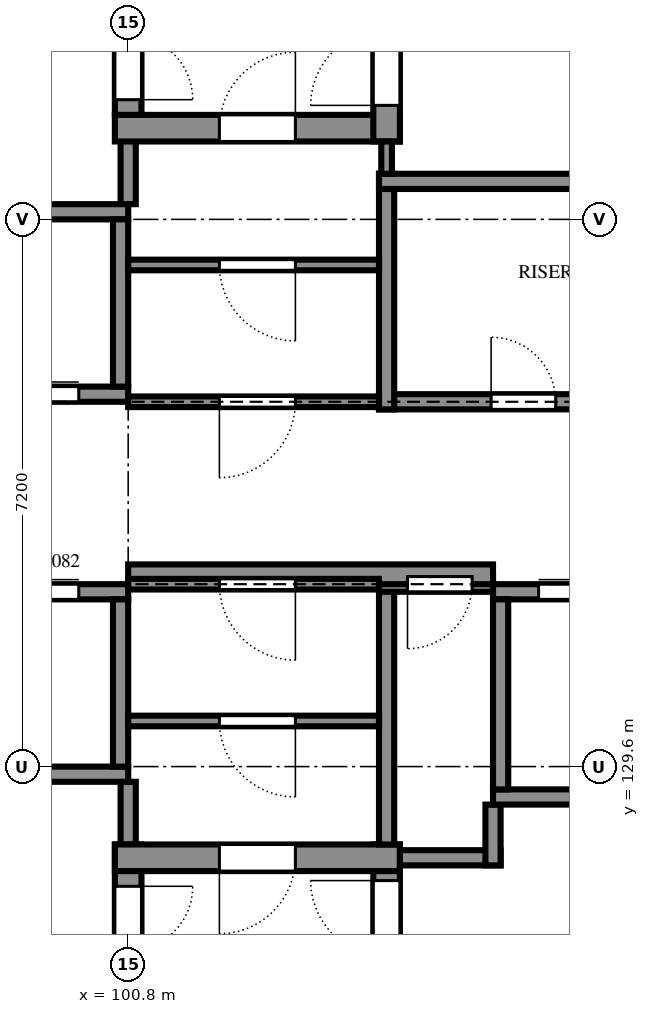
"""IFC4 building model, lengths in metres.
Left out: names, types, materials, properties, quantities, classifications, styles, units other than length and angle.
Written with IfcOpenShell. Run it as: python <this file> out.ifc"""

import sys

from ifc_helpers import new_model, si_unit, direction, frame, frame_2d, origin, place, context, subcontext, project, spatial, rectangle, extrude, element, fill, save


model = new_model("IFC4")
c1 = context("Model", 3, precision=1e-05, world=origin(), true_north=direction((0.0, 1.0)))
c2 = subcontext(c1, "Body", "Model", "MODEL_VIEW")
j1 = project(units=[si_unit("LENGTHUNIT", "METRE"), si_unit("PLANEANGLEUNIT", "RADIAN")], contexts=[c1])
p1 = place(None, origin())
s1 = spatial("IfcSite", under=j1, at=p1, CompositionType="ELEMENT")
p2 = place(p1, origin())
s2 = spatial("IfcBuilding", under=s1, at=p2, CompositionType="ELEMENT")
p3 = place(p2, frame((0.0, 0.0, 25.2)))
s3 = spatial("IfcBuildingStorey", under=s2, at=p3, CompositionType="ELEMENT", Elevation=25.2)
p4 = place(p3, frame((104.2, 125.1, 0.0), z_axis=(0.0, 0.0, 1.0), x_axis=(0.0, 1.0, 0.0)))
e1 = element("IfcWall", 1, at=p4, inside=s3, PredefinedType="SHEAR", context=c2, shape_type="SweptSolid", body=[
    extrude(rectangle(XDim=3.475, YDim=0.35, at=frame_2d((1.737, 0.0))), origin(), (0.0, 0.0, 1.0), 3.6),
])
p5 = place(p4, frame((2.0, 0.0, 0.0)))
e2 = element("IfcOpeningElement", 2, at=p5, cuts=e1, PredefinedType="OPENING", context=c2, shape_type="SweptSolid", body=[
    extrude(rectangle(XDim=1.0, YDim=2.1, at=frame_2d((0.5, 1.05))), frame((0.0, 0.185, 0.0), z_axis=(0.0, -1.0, 0.0), x_axis=(1.0, 0.0, 0.0)), (0.0, 0.0, 1.0), 0.37),
])
p6 = place(p3, frame((100.8, 128.575, 0.0), z_axis=(0.0, 0.0, 1.0), x_axis=(0.0, -1.0, 0.0)))
e3 = element("IfcWall", 3, at=p6, inside=s3, PredefinedType="SHEAR", context=c2, shape_type="SweptSolid", body=[
    extrude(rectangle(XDim=6.35, YDim=0.35, at=frame_2d((3.175, 0.0))), origin(), (0.0, 0.0, 1.0), 3.6),
])
p7 = place(p6, frame((0.55, 0.0, 0.0)))
e4 = element("IfcOpeningElement", 4, at=p7, cuts=e3, PredefinedType="OPENING", context=c2, shape_type="SweptSolid", body=[
    extrude(rectangle(XDim=0.85, YDim=2.1, at=frame_2d((0.425, 1.05))), frame((0.0, 0.185, 0.0), z_axis=(0.0, -1.0, 0.0), x_axis=(1.0, 0.0, 0.0)), (0.0, 0.0, 1.0), 0.37),
])
p8 = place(p3, frame((100.8, 128.575, 0.0), z_axis=(0.0, 0.0, 1.0), x_axis=(0.0, 1.0, 0.0)))
e5 = element("IfcWall", 5, at=p8, inside=s3, PredefinedType="SHEAR", context=c2, shape_type="SweptSolid", body=[
    extrude(rectangle(XDim=0.825, YDim=0.2, at=frame_2d((0.413, 0.0))), origin(), (0.0, 0.0, 1.0), 3.6),
])
p9 = place(p3, frame((104.375, 128.4, 0.0), z_axis=(0.0, 0.0, 1.0), x_axis=(-1.0, 0.0, 0.0)))
e6 = element("IfcWall", 6, at=p9, inside=s3, PredefinedType="SHEAR", context=c2, shape_type="SweptSolid", body=[
    extrude(rectangle(XDim=3.75, YDim=0.35, at=frame_2d((1.875, 0.0))), origin(), (0.0, 0.0, 1.0), 3.6),
])
p10 = place(p9, frame((1.375, 0.0, 0.0)))
e7 = element("IfcOpeningElement", 7, at=p10, cuts=e6, PredefinedType="OPENING", context=c2, shape_type="SweptSolid", body=[
    extrude(rectangle(XDim=1.0, YDim=2.1, at=frame_2d((0.5, 1.05))), frame((0.0, 0.185, 0.0), z_axis=(0.0, -1.0, 0.0), x_axis=(1.0, 0.0, 0.0)), (0.0, 0.0, 1.0), 0.37),
])
p11 = place(p3, frame((104.375, 128.4, 0.0), z_axis=(0.0, 0.0, 1.0), x_axis=(1.0, 0.0, 0.0)))
e8 = element("IfcWall", 8, at=p11, inside=s3, PredefinedType="SHEAR", context=c2, shape_type="SweptSolid", body=[
    extrude(rectangle(XDim=1.325, YDim=0.2, at=frame_2d((0.663, 0.0))), origin(), (0.0, 0.0, 1.0), 3.6),
])
p12 = place(p3, frame((105.6, 128.3, 0.0), z_axis=(0.0, 0.0, 1.0), x_axis=(0.0, 1.0, 0.0)))
e9 = element("IfcWall", 9, at=p12, inside=s3, PredefinedType="SHEAR", context=c2, shape_type="SweptSolid", body=[
    extrude(rectangle(XDim=0.8, YDim=0.2, at=frame_2d((0.4, 0.0))), origin(), (0.0, 0.0, 1.0), 3.6),
])
p13 = place(p3, frame((104.2, 132.1, 0.0), z_axis=(0.0, 0.0, 1.0), x_axis=(0.0, -1.0, 0.0)))
e10 = element("IfcWall", 10, at=p13, inside=s3, PredefinedType="SHEAR", context=c2, shape_type="SweptSolid", body=[
    extrude(rectangle(XDim=3.525, YDim=0.2, at=frame_2d((1.763, 0.0))), origin(), (0.0, 0.0, 1.0), 3.6),
])
p14 = place(p3, frame((105.6, 132.0, 0.0), z_axis=(0.0, 0.0, 1.0), x_axis=(-1.0, 0.0, 0.0)))
e11 = element("IfcWall", 11, at=p14, inside=s3, PredefinedType="SHEAR", context=c2, shape_type="SweptSolid", body=[
    extrude(rectangle(XDim=1.5, YDim=0.2, at=frame_2d((0.75, 0.0))), origin(), (0.0, 0.0, 1.0), 3.6),
])
p15 = place(p14, frame((0.275, 0.0, 0.0)))
e12 = element("IfcOpeningElement", 12, at=p15, cuts=e11, PredefinedType="OPENING", context=c2, shape_type="SweptSolid", body=[
    extrude(rectangle(XDim=0.85, YDim=2.1, at=frame_2d((0.425, 1.05))), frame((0.0, 0.11, 0.0), z_axis=(0.0, -1.0, 0.0), x_axis=(1.0, 0.0, 0.0)), (0.0, 0.0, 1.0), 0.22),
])
p16 = place(p3, frame((104.1, 134.4, 0.0), z_axis=(0.0, 0.0, 1.0), x_axis=(1.0, 0.0, 0.0)))
e13 = element("IfcWall", 13, at=p16, inside=s3, PredefinedType="SHEAR", context=c2, shape_type="SweptSolid", body=[
    extrude(rectangle(XDim=4.1, YDim=0.2, at=frame_2d((2.05, 0.0))), origin(), (0.0, 0.0, 1.0), 3.6),
])
p17 = place(p16, frame((1.475, 0.0, 0.0)))
e14 = element("IfcOpeningElement", 14, at=p17, cuts=e13, PredefinedType="OPENING", context=c2, shape_type="SweptSolid", body=[
    extrude(rectangle(XDim=0.85, YDim=2.1, at=frame_2d((0.425, 1.05))), frame((0.0, 0.11, 0.0), z_axis=(0.0, -1.0, 0.0), x_axis=(1.0, 0.0, 0.0)), (0.0, 0.0, 1.0), 0.22),
])
p18 = place(p3, frame((100.8, 137.0, 0.0), z_axis=(0.0, 0.0, 1.0), x_axis=(0.0, 1.0, 0.0)))
e15 = element("IfcWall", 15, at=p18, inside=s3, PredefinedType="SHEAR", context=c2, shape_type="SweptSolid", body=[
    extrude(rectangle(XDim=1.175, YDim=0.2, at=frame_2d((0.587, 0.0))), origin(), (0.0, 0.0, 1.0), 3.6),
])
p19 = place(p3, frame((104.2, 137.4, 0.0), z_axis=(0.0, 0.0, 1.0), x_axis=(0.0, -1.0, 0.0)))
e16 = element("IfcWall", 16, at=p19, inside=s3, PredefinedType="SHEAR", context=c2, shape_type="SweptSolid", body=[
    extrude(rectangle(XDim=3.1, YDim=0.2, at=frame_2d((1.55, 0.0))), origin(), (0.0, 0.0, 1.0), 3.6),
])
p20 = place(p3, frame((108.2, 137.3, 0.0), z_axis=(0.0, 0.0, 1.0), x_axis=(-1.0, 0.0, 0.0)))
e17 = element("IfcWall", 17, at=p20, inside=s3, PredefinedType="SHEAR", context=c2, shape_type="SweptSolid", body=[
    extrude(rectangle(XDim=4.1, YDim=0.2, at=frame_2d((2.05, 0.0))), origin(), (0.0, 0.0, 1.0), 3.6),
])
p21 = place(p3, frame((100.625, 138.0, 0.0), z_axis=(0.0, 0.0, 1.0), x_axis=(1.0, 0.0, 0.0)))
e18 = element("IfcWall", 18, at=p21, inside=s3, PredefinedType="SHEAR", context=c2, shape_type="SweptSolid", body=[
    extrude(rectangle(XDim=3.75, YDim=0.35, at=frame_2d((1.875, 0.0))), origin(), (0.0, 0.0, 1.0), 3.6),
])
p22 = place(p21, frame((1.375, 0.0, 0.0)))
e19 = element("IfcOpeningElement", 19, at=p22, cuts=e18, PredefinedType="OPENING", context=c2, shape_type="SweptSolid", body=[
    extrude(rectangle(XDim=1.0, YDim=2.1, at=frame_2d((0.5, 1.05))), frame((0.0, 0.185, 0.0), z_axis=(0.0, -1.0, 0.0), x_axis=(1.0, 0.0, 0.0)), (0.0, 0.0, 1.0), 0.37),
])
p23 = place(p3, frame((104.2, 137.825, 0.0), z_axis=(0.0, 0.0, 1.0), x_axis=(0.0, 1.0, 0.0)))
e20 = element("IfcWall", 20, at=p23, inside=s3, PredefinedType="SHEAR", context=c2, shape_type="SweptSolid", body=[
    extrude(rectangle(XDim=3.475, YDim=0.35, at=frame_2d((1.738, 0.0))), origin(), (0.0, 0.0, 1.0), 3.6),
])
p24 = place(p23, frame((0.475, 0.0, 0.0)))
e21 = element("IfcOpeningElement", 21, at=p24, cuts=e20, PredefinedType="OPENING", context=c2, shape_type="SweptSolid", body=[
    extrude(rectangle(XDim=1.0, YDim=2.1, at=frame_2d((0.5, 1.05))), frame((0.0, 0.185, 0.0), z_axis=(0.0, -1.0, 0.0), x_axis=(1.0, 0.0, 0.0)), (0.0, 0.0, 1.0), 0.37),
])
p25 = place(p3, frame((100.8, 144.175, 0.0), z_axis=(0.0, 0.0, 1.0), x_axis=(0.0, -1.0, 0.0)))
e22 = element("IfcWall", 22, at=p25, inside=s3, PredefinedType="SHEAR", context=c2, shape_type="SweptSolid", body=[
    extrude(rectangle(XDim=6.0, YDim=0.35, at=frame_2d((3.0, 0.0))), origin(), (0.0, 0.0, 1.0), 3.6),
])
p26 = place(p25, frame((4.95, 0.0, 0.0)))
e23 = element("IfcOpeningElement", 23, at=p26, cuts=e22, PredefinedType="OPENING", context=c2, shape_type="SweptSolid", body=[
    extrude(rectangle(XDim=0.85, YDim=2.1, at=frame_2d((0.425, 1.05))), frame((0.0, 0.185, 0.0), z_axis=(0.0, -1.0, 0.0), x_axis=(1.0, 0.0, 0.0)), (0.0, 0.0, 1.0), 0.37),
])
p27 = place(p3, frame((100.8, 132.13, 3.6), z_axis=(0.0, 0.0, 1.0), x_axis=(1.0, 0.0, 0.0)))
e24 = element("IfcWall", 24, at=p27, inside=s3, PredefinedType="PARAPET", context=c2, shape_type="SweptSolid", body=[
    extrude(rectangle(XDim=4.8, YDim=0.26, at=frame_2d((2.4, 0.0))), origin(), (0.0, 0.0, 1.0), 1.0),
])
p28 = place(p3, frame((98.4, 129.5, 0.0), z_axis=(0.0, 0.0, 1.0), x_axis=(1.0, 0.0, 0.0)))
e25 = element("IfcWall", 25, at=p28, inside=s3, PredefinedType="SHEAR", context=c2, shape_type="SweptSolid", body=[
    extrude(rectangle(XDim=2.4, YDim=0.2, at=frame_2d((1.2, 0.0))), origin(), (0.0, 0.0, 1.0), 4.5),
])
p29 = place(p3, frame((98.4, 131.9, 0.0), z_axis=(0.0, 0.0, 1.0), x_axis=(1.0, 0.0, 0.0)))
e26 = element("IfcWall", 26, at=p29, inside=s3, PredefinedType="SHEAR", context=c2, shape_type="SweptSolid", body=[
    extrude(rectangle(XDim=2.4, YDim=0.2, at=frame_2d((1.2, 0.0))), origin(), (0.0, 0.0, 1.0), 4.5),
])
p30 = place(p29, frame((0.65, 0.0, 0.0)))
e27 = element("IfcOpeningElement", 27, at=p30, cuts=e26, PredefinedType="OPENING", context=c2, shape_type="SweptSolid", body=[
    extrude(rectangle(XDim=1.1, YDim=2.1, at=frame_2d((0.55, 1.05))), frame((0.0, 0.11, 0.0), z_axis=(0.0, -1.0, 0.0), x_axis=(1.0, 0.0, 0.0)), (0.0, 0.0, 1.0), 0.22),
])
p31 = place(p3, frame((100.7, 129.6, 0.0), z_axis=(0.0, 0.0, 1.0), x_axis=(0.0, 1.0, 0.0)))
e28 = element("IfcWall", 28, at=p31, inside=s3, PredefinedType="SHEAR", context=c2, shape_type="SweptSolid", body=[
    extrude(rectangle(XDim=2.2, YDim=0.2, at=frame_2d((1.1, 0.0))), origin(), (0.0, 0.0, 1.0), 4.5),
])
p32 = place(p3, frame((98.4, 134.5, 0.0), z_axis=(0.0, 0.0, 1.0), x_axis=(1.0, 0.0, 0.0)))
e29 = element("IfcWall", 29, at=p32, inside=s3, PredefinedType="SHEAR", context=c2, shape_type="SweptSolid", body=[
    extrude(rectangle(XDim=2.4, YDim=0.2, at=frame_2d((1.2, 0.0))), origin(), (0.0, 0.0, 1.0), 4.5),
])
p33 = place(p32, frame((0.65, 0.0, 0.0)))
e30 = element("IfcOpeningElement", 30, at=p33, cuts=e29, PredefinedType="OPENING", context=c2, shape_type="SweptSolid", body=[
    extrude(rectangle(XDim=1.1, YDim=2.1, at=frame_2d((0.55, 1.05))), frame((0.0, 0.11, 0.0), z_axis=(0.0, -1.0, 0.0), x_axis=(1.0, 0.0, 0.0)), (0.0, 0.0, 1.0), 0.22),
])
p34 = place(p3, frame((98.4, 136.9, 0.0), z_axis=(0.0, 0.0, 1.0), x_axis=(1.0, 0.0, 0.0)))
e31 = element("IfcWall", 31, at=p34, inside=s3, PredefinedType="SHEAR", context=c2, shape_type="SweptSolid", body=[
    extrude(rectangle(XDim=2.4, YDim=0.2, at=frame_2d((1.2, 0.0))), origin(), (0.0, 0.0, 1.0), 4.5),
])
p35 = place(p3, frame((100.7, 134.6, 0.0), z_axis=(0.0, 0.0, 1.0), x_axis=(0.0, 1.0, 0.0)))
e32 = element("IfcWall", 32, at=p35, inside=s3, PredefinedType="SHEAR", context=c2, shape_type="SweptSolid", body=[
    extrude(rectangle(XDim=2.2, YDim=0.2, at=frame_2d((1.1, 0.0))), origin(), (0.0, 0.0, 1.0), 4.5),
])
p36 = place(p3, frame((105.6, 129.2, 0.0), z_axis=(0.0, 0.0, 1.0), x_axis=(1.0, 0.0, 0.0)))
e33 = element("IfcWall", 33, at=p36, inside=s3, PredefinedType="SHEAR", context=c2, shape_type="SweptSolid", body=[
    extrude(rectangle(XDim=2.4, YDim=0.2, at=frame_2d((1.2, 0.0))), origin(), (0.0, 0.0, 1.0), 4.5),
])
p37 = place(p3, frame((105.6, 131.9, 0.0), z_axis=(0.0, 0.0, 1.0), x_axis=(1.0, 0.0, 0.0)))
e34 = element("IfcWall", 34, at=p37, inside=s3, PredefinedType="SHEAR", context=c2, shape_type="SweptSolid", body=[
    extrude(rectangle(XDim=2.4, YDim=0.2, at=frame_2d((1.2, 0.0))), origin(), (0.0, 0.0, 1.0), 4.5),
])
p38 = place(p37, frame((0.6, 0.0, 0.0)))
e35 = element("IfcOpeningElement", 35, at=p38, cuts=e34, PredefinedType="OPENING", context=c2, shape_type="SweptSolid", body=[
    extrude(rectangle(XDim=1.2, YDim=2.1, at=frame_2d((0.6, 1.05))), frame((0.0, 0.11, 0.0), z_axis=(0.0, -1.0, 0.0), x_axis=(1.0, 0.0, 0.0)), (0.0, 0.0, 1.0), 0.22),
])
p39 = place(p3, frame((105.7, 129.3, 0.0), z_axis=(0.0, 0.0, 1.0), x_axis=(0.0, 1.0, 0.0)))
e36 = element("IfcWall", 36, at=p39, inside=s3, PredefinedType="SHEAR", context=c2, shape_type="SweptSolid", body=[
    extrude(rectangle(XDim=2.5, YDim=0.2, at=frame_2d((1.25, 0.0))), origin(), (0.0, 0.0, 1.0), 4.5),
])
p40 = place(p3, frame((100.8, 130.2, 0.0), z_axis=(0.0, 0.0, 1.0), x_axis=(1.0, 0.0, 0.0)))
e37 = element("IfcWall", 37, at=p40, inside=s3, PredefinedType="PARTITIONING", context=c2, shape_type="SweptSolid", body=[
    extrude(rectangle(XDim=3.3, YDim=0.14, at=frame_2d((1.65, 0.0))), origin(), (0.0, 0.0, 1.0), 3.29),
])
p41 = place(p40, frame((1.2, 0.0, 0.0)))
e38 = element("IfcOpeningElement", 38, at=p41, cuts=e37, PredefinedType="OPENING", context=c2, shape_type="SweptSolid", body=[
    extrude(rectangle(XDim=1.0, YDim=2.1, at=frame_2d((0.5, 1.05))), frame((0.0, 0.08, 0.0), z_axis=(0.0, -1.0, 0.0), x_axis=(1.0, 0.0, 0.0)), (0.0, 0.0, 1.0), 0.16),
])
p42 = place(p3, frame((100.8, 132.0, 0.0), z_axis=(0.0, 0.0, 1.0), x_axis=(1.0, 0.0, 0.0)))
e39 = element("IfcWall", 39, at=p42, inside=s3, PredefinedType="PARTITIONING", context=c2, shape_type="SweptSolid", body=[
    extrude(rectangle(XDim=3.3, YDim=0.14, at=frame_2d((1.65, 0.0))), origin(), (0.0, 0.0, 1.0), 3.29),
])
p43 = place(p42, frame((1.2, 0.0, 0.0)))
e40 = element("IfcOpeningElement", 40, at=p43, cuts=e39, PredefinedType="OPENING", context=c2, shape_type="SweptSolid", body=[
    extrude(rectangle(XDim=1.0, YDim=2.1, at=frame_2d((0.5, 1.05))), frame((0.0, 0.08, 0.0), z_axis=(0.0, -1.0, 0.0), x_axis=(1.0, 0.0, 0.0)), (0.0, 0.0, 1.0), 0.16),
])
p44 = place(p3, frame((100.8, 134.4, 0.0), z_axis=(0.0, 0.0, 1.0), x_axis=(1.0, 0.0, 0.0)))
e41 = element("IfcWall", 41, at=p44, inside=s3, PredefinedType="PARTITIONING", context=c2, shape_type="SweptSolid", body=[
    extrude(rectangle(XDim=3.3, YDim=0.14, at=frame_2d((1.65, 0.0))), origin(), (0.0, 0.0, 1.0), 3.29),
])
p45 = place(p44, frame((1.2, 0.0, 0.0)))
e42 = element("IfcOpeningElement", 42, at=p45, cuts=e41, PredefinedType="OPENING", context=c2, shape_type="SweptSolid", body=[
    extrude(rectangle(XDim=1.0, YDim=2.1, at=frame_2d((0.5, 1.05))), frame((0.0, 0.08, 0.0), z_axis=(0.0, -1.0, 0.0), x_axis=(1.0, 0.0, 0.0)), (0.0, 0.0, 1.0), 0.16),
])
p46 = place(p3, frame((100.8, 136.2, 0.0), z_axis=(0.0, 0.0, 1.0), x_axis=(1.0, 0.0, 0.0)))
e43 = element("IfcWall", 43, at=p46, inside=s3, PredefinedType="PARTITIONING", context=c2, shape_type="SweptSolid", body=[
    extrude(rectangle(XDim=3.3, YDim=0.14, at=frame_2d((1.65, 0.0))), origin(), (0.0, 0.0, 1.0), 3.29),
])
p47 = place(p46, frame((1.2, 0.0, 0.0)))
e44 = element("IfcOpeningElement", 44, at=p47, cuts=e43, PredefinedType="OPENING", context=c2, shape_type="SweptSolid", body=[
    extrude(rectangle(XDim=1.0, YDim=2.1, at=frame_2d((0.5, 1.05))), frame((0.0, 0.08, 0.0), z_axis=(0.0, -1.0, 0.0), x_axis=(1.0, 0.0, 0.0)), (0.0, 0.0, 1.0), 0.16),
])
p48 = place(p3, frame((104.2, 137.4, 0.0), z_axis=(0.0, 0.0, 1.0), x_axis=(0.0, 1.0, 0.0)))
e45 = element("IfcWall", 45, at=p48, inside=s3, PredefinedType="PARTITIONING", context=c2, shape_type="SweptSolid", body=[
    extrude(rectangle(XDim=0.425, YDim=0.14, at=frame_2d((0.212, 0.0))), origin(), (0.0, 0.0, 1.0), 3.29),
])
p49 = place(p30, origin())
e46 = element("IfcDoor", 46, at=p49, inside=s3, OperationType="SLIDING_TO_LEFT", PredefinedType="DOOR", context=c2, shape_type="SweptSolid", body=[
    extrude(rectangle(XDim=1.1, YDim=2.1, at=frame_2d((0.55, 1.05))), frame((0.0, 0.025, 0.0), z_axis=(0.0, -1.0, 0.0), x_axis=(1.0, 0.0, 0.0)), (0.0, 0.0, 1.0), 0.05),
])
fill(e27, e46)
p50 = place(p33, origin())
e47 = element("IfcDoor", 47, at=p50, inside=s3, OperationType="SLIDING_TO_LEFT", PredefinedType="DOOR", context=c2, shape_type="SweptSolid", body=[
    extrude(rectangle(XDim=1.1, YDim=2.1, at=frame_2d((0.55, 1.05))), frame((0.0, 0.025, 0.0), z_axis=(0.0, -1.0, 0.0), x_axis=(1.0, 0.0, 0.0)), (0.0, 0.0, 1.0), 0.05),
])
fill(e30, e47)
p51 = place(p38, origin())
e48 = element("IfcDoor", 48, at=p51, inside=s3, OperationType="SLIDING_TO_LEFT", PredefinedType="DOOR", context=c2, shape_type="SweptSolid", body=[
    extrude(rectangle(XDim=1.2, YDim=2.1, at=frame_2d((0.6, 1.05))), frame((0.0, 0.025, 0.0), z_axis=(0.0, -1.0, 0.0), x_axis=(1.0, 0.0, 0.0)), (0.0, 0.0, 1.0), 0.05),
])
fill(e35, e48)
p52 = place(p41, frame((1.0, 0.0, 0.0), z_axis=(0.0, 0.0, 1.0), x_axis=(-1.0, 0.0, 0.0)))
e49 = element("IfcDoor", 49, at=p52, inside=s3, OperationType="SINGLE_SWING_RIGHT", PredefinedType="DOOR", context=c2, shape_type="SweptSolid", body=[
    extrude(rectangle(XDim=1.0, YDim=2.1, at=frame_2d((0.5, 1.05))), frame((0.0, 0.025, 0.0), z_axis=(0.0, -1.0, 0.0), x_axis=(1.0, 0.0, 0.0)), (0.0, 0.0, 1.0), 0.05),
])
fill(e38, e49)
p53 = place(p43, frame((1.0, 0.0, 0.0), z_axis=(0.0, 0.0, 1.0), x_axis=(-1.0, 0.0, 0.0)))
e50 = element("IfcDoor", 50, at=p53, inside=s3, OperationType="SINGLE_SWING_RIGHT", PredefinedType="DOOR", context=c2, shape_type="SweptSolid", body=[
    extrude(rectangle(XDim=1.0, YDim=2.1, at=frame_2d((0.5, 1.05))), frame((0.0, 0.025, 0.0), z_axis=(0.0, -1.0, 0.0), x_axis=(1.0, 0.0, 0.0)), (0.0, 0.0, 1.0), 0.05),
])
fill(e40, e50)
p54 = place(p45, frame((1.0, 0.0, 0.0), z_axis=(0.0, 0.0, 1.0), x_axis=(-1.0, 0.0, 0.0)))
e51 = element("IfcDoor", 51, at=p54, inside=s3, OperationType="SINGLE_SWING_LEFT", PredefinedType="DOOR", context=c2, shape_type="SweptSolid", body=[
    extrude(rectangle(XDim=1.0, YDim=2.1, at=frame_2d((0.5, 1.05))), frame((0.0, 0.025, 0.0), z_axis=(0.0, -1.0, 0.0), x_axis=(1.0, 0.0, 0.0)), (0.0, 0.0, 1.0), 0.05),
])
fill(e42, e51)
p55 = place(p47, frame((1.0, 0.0, 0.0), z_axis=(0.0, 0.0, 1.0), x_axis=(-1.0, 0.0, 0.0)))
e52 = element("IfcDoor", 52, at=p55, inside=s3, OperationType="SINGLE_SWING_RIGHT", PredefinedType="DOOR", context=c2, shape_type="SweptSolid", body=[
    extrude(rectangle(XDim=1.0, YDim=2.1, at=frame_2d((0.5, 1.05))), frame((0.0, 0.025, 0.0), z_axis=(0.0, -1.0, 0.0), x_axis=(1.0, 0.0, 0.0)), (0.0, 0.0, 1.0), 0.05),
])
fill(e44, e52)
p56 = place(p10, origin())
e53 = element("IfcDoor", 53, at=p56, inside=s3, OperationType="SINGLE_SWING_LEFT", PredefinedType="DOOR", context=c2, shape_type="SweptSolid", body=[
    extrude(rectangle(XDim=1.0, YDim=2.1, at=frame_2d((0.5, 1.05))), frame((0.0, 0.025, 0.0), z_axis=(0.0, -1.0, 0.0), x_axis=(1.0, 0.0, 0.0)), (0.0, 0.0, 1.0), 0.05),
])
fill(e7, e53)
p57 = place(p7, origin())
e54 = element("IfcDoor", 54, at=p57, inside=s3, OperationType="SINGLE_SWING_RIGHT", PredefinedType="DOOR", context=c2, shape_type="SweptSolid", body=[
    extrude(rectangle(XDim=0.85, YDim=2.1, at=frame_2d((0.425, 1.05))), frame((0.0, 0.025, 0.0), z_axis=(0.0, -1.0, 0.0), x_axis=(1.0, 0.0, 0.0)), (0.0, 0.0, 1.0), 0.05),
])
fill(e4, e54)
p58 = place(p5, origin())
e55 = element("IfcDoor", 55, at=p58, inside=s3, OperationType="SINGLE_SWING_LEFT", PredefinedType="DOOR", context=c2, shape_type="SweptSolid", body=[
    extrude(rectangle(XDim=1.0, YDim=2.1, at=frame_2d((0.5, 1.05))), frame((0.0, 0.025, 0.0), z_axis=(0.0, -1.0, 0.0), x_axis=(1.0, 0.0, 0.0)), (0.0, 0.0, 1.0), 0.05),
])
fill(e2, e55)
p59 = place(p15, origin())
e56 = element("IfcDoor", 56, at=p59, inside=s3, OperationType="SINGLE_SWING_LEFT", PredefinedType="DOOR", context=c2, shape_type="SweptSolid", body=[
    extrude(rectangle(XDim=0.85, YDim=2.1, at=frame_2d((0.425, 1.05))), frame((0.0, 0.025, 0.0), z_axis=(0.0, -1.0, 0.0), x_axis=(1.0, 0.0, 0.0)), (0.0, 0.0, 1.0), 0.05),
])
fill(e12, e56)
p60 = place(p17, origin())
e57 = element("IfcDoor", 57, at=p60, inside=s3, OperationType="SINGLE_SWING_RIGHT", PredefinedType="DOOR", context=c2, shape_type="SweptSolid", body=[
    extrude(rectangle(XDim=0.85, YDim=2.1, at=frame_2d((0.425, 1.05))), frame((0.0, 0.025, 0.0), z_axis=(0.0, -1.0, 0.0), x_axis=(1.0, 0.0, 0.0)), (0.0, 0.0, 1.0), 0.05),
])
fill(e14, e57)
p61 = place(p22, origin())
e58 = element("IfcDoor", 58, at=p61, inside=s3, OperationType="SINGLE_SWING_LEFT", PredefinedType="DOOR", context=c2, shape_type="SweptSolid", body=[
    extrude(rectangle(XDim=1.0, YDim=2.1, at=frame_2d((0.5, 1.05))), frame((0.0, 0.025, 0.0), z_axis=(0.0, -1.0, 0.0), x_axis=(1.0, 0.0, 0.0)), (0.0, 0.0, 1.0), 0.05),
])
fill(e19, e58)
p62 = place(p26, origin())
e59 = element("IfcDoor", 59, at=p62, inside=s3, OperationType="SINGLE_SWING_LEFT", PredefinedType="DOOR", context=c2, shape_type="SweptSolid", body=[
    extrude(rectangle(XDim=0.85, YDim=2.1, at=frame_2d((0.425, 1.05))), frame((0.0, 0.025, 0.0), z_axis=(0.0, -1.0, 0.0), x_axis=(1.0, 0.0, 0.0)), (0.0, 0.0, 1.0), 0.05),
])
fill(e23, e59)
p63 = place(p24, origin())
e60 = element("IfcDoor", 60, at=p63, inside=s3, OperationType="SINGLE_SWING_RIGHT", PredefinedType="DOOR", context=c2, shape_type="SweptSolid", body=[
    extrude(rectangle(XDim=1.0, YDim=2.1, at=frame_2d((0.5, 1.05))), frame((0.0, 0.025, 0.0), z_axis=(0.0, -1.0, 0.0), x_axis=(1.0, 0.0, 0.0)), (0.0, 0.0, 1.0), 0.05),
])
fill(e21, e60)
save(model, sys.argv[1])
